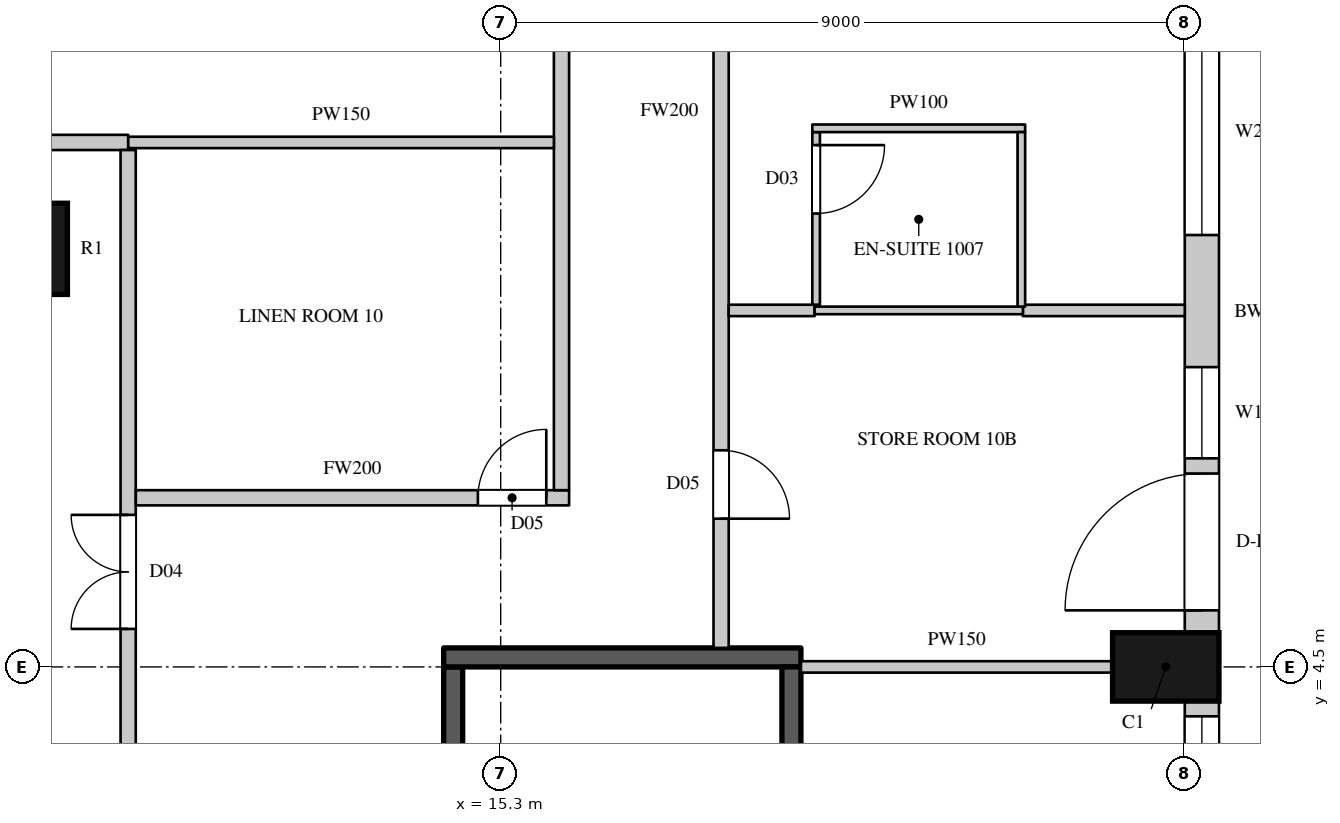
"""IFC4 building model, lengths in metres.
Left out: names, types, materials, properties, quantities, classifications, styles, units other than length and angle.
Written with IfcOpenShell. Run it as: python <this file> out.ifc"""

import sys

from ifc_helpers import new_model, si_unit, direction, frame, frame_2d, origin, origin_2d, place, context, subcontext, project, spatial, rectangle, circle, extrude, element, fill, save


model = new_model("IFC4")
c1 = context("Model", 3, precision=1e-05, world=origin(), true_north=direction((0.0, 1.0)))
c2 = subcontext(c1, "Body", "Model", "MODEL_VIEW")
j1 = project(units=[si_unit("LENGTHUNIT", "METRE"), si_unit("PLANEANGLEUNIT", "RADIAN")], contexts=[c1])
p1 = place(None, origin())
s1 = spatial("IfcSite", under=j1, at=p1, CompositionType="ELEMENT")
p2 = place(p1, origin())
s2 = spatial("IfcBuilding", under=s1, at=p2, CompositionType="ELEMENT")
p3 = place(p2, frame((0.0, 0.0, 66.3)))
s3 = spatial("IfcBuildingStorey", under=s2, at=p3, CompositionType="ELEMENT", Elevation=66.3)
p4 = place(p3, frame((24.05, 4.5, 0.0), z_axis=(0.0, 0.0, 1.0), x_axis=(0.0, 1.0, 0.0)))
e1 = element("IfcColumn", 1, at=p4, inside=s3, PredefinedType="COLUMN", context=c2, shape_type="SweptSolid", body=[
    extrude(rectangle(XDim=0.9, YDim=1.4, at=origin_2d()), origin(), (0.0, 0.0, 1.0), 3.6),
])
p5 = place(p3, frame((9.0, 10.0, 0.0), z_axis=(0.0, 0.0, 1.0), x_axis=(1.0, 0.0, 0.0)))
e2 = element("IfcColumn", 2, at=p5, inside=s3, PredefinedType="COLUMN", context=c2, shape_type="SweptSolid", body=[
    extrude(circle(Radius=0.6, at=origin_2d()), origin(), (0.0, 0.0, 1.0), 3.6),
])
p6 = place(p3, frame((24.525, -4.05, 0.0), z_axis=(0.0, 0.0, 1.0), x_axis=(0.0, 1.0, 0.0)))
e3 = element("IfcWall", 3, at=p6, inside=s3, PredefinedType="SOLIDWALL", context=c2, shape_type="SweptSolid", body=[
    extrude(rectangle(XDim=8.1, YDim=0.45, at=frame_2d((4.05, 0.0))), origin(), (0.0, 0.0, 1.0), 3.3),
])
p7 = place(p6, frame((0.2, 0.0, 0.0)))
e4 = element("IfcOpeningElement", 4, at=p7, cuts=e3, PredefinedType="OPENING", context=c2, shape_type="SweptSolid", body=[
    extrude(rectangle(XDim=1.8, YDim=2.4, at=frame_2d((0.9, 1.2))), frame((0.0, 0.235, 0.0), z_axis=(0.0, -1.0, 0.0), x_axis=(1.0, 0.0, 0.0)), (0.0, 0.0, 1.0), 0.47),
])
p8 = place(p6, frame((2.2, 0.0, 1.05)))
e5 = element("IfcOpeningElement", 5, at=p8, cuts=e3, PredefinedType="OPENING", context=c2, shape_type="SweptSolid", body=[
    extrude(rectangle(XDim=1.2, YDim=2.0, at=frame_2d((0.6, 1.0))), frame((0.0, 0.235, 0.0), z_axis=(0.0, -1.0, 0.0), x_axis=(1.0, 0.0, 0.0)), (0.0, 0.0, 1.0), 0.47),
])
p9 = place(p6, frame((4.7, 0.0, 0.0)))
e6 = element("IfcOpeningElement", 6, at=p9, cuts=e3, PredefinedType="OPENING", context=c2, shape_type="SweptSolid", body=[
    extrude(rectangle(XDim=1.8, YDim=2.4, at=frame_2d((0.9, 1.2))), frame((0.0, 0.235, 0.0), z_axis=(0.0, -1.0, 0.0), x_axis=(1.0, 0.0, 0.0)), (0.0, 0.0, 1.0), 0.47),
])
p10 = place(p6, frame((6.7, 0.0, 1.05)))
e7 = element("IfcOpeningElement", 7, at=p10, cuts=e3, PredefinedType="OPENING", context=c2, shape_type="SweptSolid", body=[
    extrude(rectangle(XDim=1.2, YDim=2.0, at=frame_2d((0.6, 1.0))), frame((0.0, 0.235, 0.0), z_axis=(0.0, -1.0, 0.0), x_axis=(1.0, 0.0, 0.0)), (0.0, 0.0, 1.0), 0.47),
])
p11 = place(p3, frame((24.525, 4.95, 0.0), z_axis=(0.0, 0.0, 1.0), x_axis=(0.0, 1.0, 0.0)))
e8 = element("IfcWall", 8, at=p11, inside=s3, PredefinedType="SOLIDWALL", context=c2, shape_type="SweptSolid", body=[
    extrude(rectangle(XDim=8.439, YDim=0.45, at=frame_2d((4.219, 0.0))), origin(), (0.0, 0.0, 1.0), 3.3),
])
p12 = place(p11, frame((0.294, 0.0, 0.0)))
e9 = element("IfcOpeningElement", 9, at=p12, cuts=e8, PredefinedType="OPENING", context=c2, shape_type="SweptSolid", body=[
    extrude(rectangle(XDim=1.8, YDim=2.4, at=frame_2d((0.9, 1.2))), frame((0.0, 0.235, 0.0), z_axis=(0.0, -1.0, 0.0), x_axis=(1.0, 0.0, 0.0)), (0.0, 0.0, 1.0), 0.47),
])
p13 = place(p11, frame((2.294, 0.0, 1.05)))
e10 = element("IfcOpeningElement", 10, at=p13, cuts=e8, PredefinedType="OPENING", context=c2, shape_type="SweptSolid", body=[
    extrude(rectangle(XDim=1.2, YDim=2.0, at=frame_2d((0.6, 1.0))), frame((0.0, 0.235, 0.0), z_axis=(0.0, -1.0, 0.0), x_axis=(1.0, 0.0, 0.0)), (0.0, 0.0, 1.0), 0.47),
])
p14 = place(p11, frame((5.232, 0.0, 1.05)))
e11 = element("IfcOpeningElement", 11, at=p14, cuts=e8, PredefinedType="OPENING", context=c2, shape_type="SweptSolid", body=[
    extrude(rectangle(XDim=2.7, YDim=2.0, at=frame_2d((1.35, 1.0))), frame((0.0, 0.235, 0.0), z_axis=(0.0, -1.0, 0.0), x_axis=(1.0, 0.0, 0.0)), (0.0, 0.0, 1.0), 0.47),
])
p15 = place(p3, frame((-8.3, 11.4, 0.0), z_axis=(0.0, 0.0, 1.0), x_axis=(1.0, 0.0, 0.0)))
e12 = element("IfcWall", 12, at=p15, inside=s3, PredefinedType="PARTITIONING", context=c2, shape_type="SweptSolid", body=[
    extrude(rectangle(XDim=18.7, YDim=0.2, at=frame_2d((9.35, 0.0))), origin(), (0.0, 0.0, 1.0), 3.3),
])
p16 = place(p15, frame((5.5, 0.0, 0.0)))
e13 = element("IfcOpeningElement", 13, at=p16, cuts=e12, PredefinedType="OPENING", context=c2, shape_type="SweptSolid", body=[
    extrude(rectangle(XDim=1.5, YDim=2.2, at=frame_2d((0.75, 1.1))), frame((0.0, 0.11, 0.0), z_axis=(0.0, -1.0, 0.0), x_axis=(1.0, 0.0, 0.0)), (0.0, 0.0, 1.0), 0.22),
])
p17 = place(p3, frame((10.399, -12.5, 0.0), z_axis=(0.0, 0.0, 1.0), x_axis=(0.0, 1.0, 0.0)))
e14 = element("IfcWall", 14, at=p17, inside=s3, PredefinedType="PARTITIONING", context=c2, shape_type="SweptSolid", body=[
    extrude(rectangle(XDim=23.8, YDim=0.2, at=frame_2d((11.9, 0.0))), origin(), (0.0, 0.0, 1.0), 3.3),
])
p18 = place(p17, frame((6.0, 0.0, 0.0)))
e15 = element("IfcOpeningElement", 15, at=p18, cuts=e14, PredefinedType="OPENING", context=c2, shape_type="SweptSolid", body=[
    extrude(rectangle(XDim=1.5, YDim=2.2, at=frame_2d((0.75, 1.1))), frame((0.0, 0.11, 0.0), z_axis=(0.0, -1.0, 0.0), x_axis=(1.0, 0.0, 0.0)), (0.0, 0.0, 1.0), 0.22),
])
p19 = place(p17, frame((17.5, 0.0, 0.0)))
e16 = element("IfcOpeningElement", 16, at=p19, cuts=e14, PredefinedType="OPENING", context=c2, shape_type="SweptSolid", body=[
    extrude(rectangle(XDim=1.5, YDim=2.2, at=frame_2d((0.75, 1.1))), frame((0.0, 0.11, 0.0), z_axis=(0.0, -1.0, 0.0), x_axis=(1.0, 0.0, 0.0)), (0.0, 0.0, 1.0), 0.22),
])
p20 = place(p17, frame((7.7, 0.0, 0.0)))
e17 = element("IfcOpeningElement", 17, at=p20, cuts=e14, PredefinedType="OPENING", context=c2, shape_type="SweptSolid", body=[
    extrude(rectangle(XDim=1.5, YDim=2.2, at=frame_2d((0.75, 1.1))), frame((0.0, 0.11, 0.0), z_axis=(0.0, -1.0, 0.0), x_axis=(1.0, 0.0, 0.0)), (0.0, 0.0, 1.0), 0.22),
])
p21 = place(p17, frame((13.15, 0.0, 0.0)))
e18 = element("IfcOpeningElement", 18, at=p21, cuts=e14, PredefinedType="OPENING", context=c2, shape_type="SweptSolid", body=[
    extrude(rectangle(XDim=1.5, YDim=2.2, at=frame_2d((0.75, 1.1))), frame((0.0, 0.11, 0.0), z_axis=(0.0, -1.0, 0.0), x_axis=(1.0, 0.0, 0.0)), (0.0, 0.0, 1.0), 0.22),
])
p22 = place(p3, frame((10.5, 6.725, 0.0), z_axis=(0.0, 0.0, 1.0), x_axis=(1.0, 0.0, 0.0)))
e19 = element("IfcWall", 19, at=p22, inside=s3, PredefinedType="PARTITIONING", context=c2, shape_type="SweptSolid", body=[
    extrude(rectangle(XDim=5.7, YDim=0.2, at=frame_2d((2.85, 0.0))), origin(), (0.0, 0.0, 1.0), 3.3),
])
p23 = place(p22, frame((4.5, 0.0, 0.0)))
e20 = element("IfcOpeningElement", 20, at=p23, cuts=e19, PredefinedType="OPENING", context=c2, shape_type="SweptSolid", body=[
    extrude(rectangle(XDim=0.9, YDim=2.2, at=frame_2d((0.45, 1.1))), frame((0.0, 0.11, 0.0), z_axis=(0.0, -1.0, 0.0), x_axis=(1.0, 0.0, 0.0)), (0.0, 0.0, 1.0), 0.22),
])
p24 = place(p3, frame((16.1, 6.825, 0.0), z_axis=(0.0, 0.0, 1.0), x_axis=(0.0, 1.0, 0.0)))
e21 = element("IfcWall", 21, at=p24, inside=s3, PredefinedType="PARTITIONING", context=c2, shape_type="SweptSolid", body=[
    extrude(rectangle(XDim=10.575, YDim=0.2, at=frame_2d((5.288, 0.0))), origin(), (0.0, 0.0, 1.0), 3.3),
])
p25 = place(p3, frame((18.2, 4.75, 0.0), z_axis=(0.0, 0.0, 1.0), x_axis=(0.0, 1.0, 0.0)))
e22 = element("IfcWall", 22, at=p25, inside=s3, PredefinedType="PARTITIONING", context=c2, shape_type="SweptSolid", body=[
    extrude(rectangle(XDim=14.134, YDim=0.2, at=frame_2d((7.067, 0.0))), origin(), (0.0, 0.0, 1.0), 3.3),
])
p26 = place(p25, frame((1.7, 0.0, 0.0)))
e23 = element("IfcOpeningElement", 23, at=p26, cuts=e22, PredefinedType="OPENING", context=c2, shape_type="SweptSolid", body=[
    extrude(rectangle(XDim=0.9, YDim=2.2, at=frame_2d((0.45, 1.1))), frame((0.0, 0.11, 0.0), z_axis=(0.0, -1.0, 0.0), x_axis=(1.0, 0.0, 0.0)), (0.0, 0.0, 1.0), 0.22),
])
p27 = place(p3, frame((10.4, 11.4, 0.0), z_axis=(0.0, 0.0, 1.0), x_axis=(1.0, 0.0, 0.0)))
e24 = element("IfcWall", 24, at=p27, inside=s3, PredefinedType="PARTITIONING", context=c2, shape_type="SweptSolid", body=[
    extrude(rectangle(XDim=5.6, YDim=0.15, at=frame_2d((2.8, 0.0))), origin(), (0.0, 0.0, 1.0), 3.3),
])
p28 = place(p3, frame((18.3, 9.19, 0.0), z_axis=(0.0, 0.0, 1.0), x_axis=(1.0, 0.0, 0.0)))
e25 = element("IfcWall", 25, at=p28, inside=s3, PredefinedType="PARTITIONING", context=c2, shape_type="SweptSolid", body=[
    extrude(rectangle(XDim=1.13, YDim=0.15, at=frame_2d((0.565, 0.0))), origin(), (0.0, 0.0, 1.0), 2.65),
])
p29 = place(p3, frame((19.25, 4.5, 0.0), z_axis=(0.0, 0.0, 1.0), x_axis=(1.0, 0.0, 0.0)))
e26 = element("IfcWall", 26, at=p29, inside=s3, PredefinedType="PARTITIONING", context=c2, shape_type="SweptSolid", body=[
    extrude(rectangle(XDim=4.1, YDim=0.15, at=frame_2d((2.05, 0.0))), origin(), (0.0, 0.0, 1.0), 3.3),
])
p30 = place(p3, frame((22.17, 9.19, 0.0), z_axis=(0.0, 0.0, 1.0), x_axis=(1.0, 0.0, 0.0)))
e27 = element("IfcWall", 27, at=p30, inside=s3, PredefinedType="PARTITIONING", context=c2, shape_type="SweptSolid", body=[
    extrude(rectangle(XDim=2.13, YDim=0.15, at=frame_2d((1.065, 0.0))), origin(), (0.0, 0.0, 1.0), 2.65),
])
p31 = place(p3, frame((14.675, -4.5, 0.0), z_axis=(0.0, 0.0, 1.0), x_axis=(0.0, 1.0, 0.0)))
e28 = element("IfcWall", 28, at=p31, inside=s3, PredefinedType="SHEAR", context=c2, shape_type="SweptSolid", body=[
    extrude(rectangle(XDim=9.0, YDim=0.25, at=frame_2d((4.5, 0.0))), origin(), (0.0, 0.0, 1.0), 3.3),
])
p32 = place(p31, frame((0.45, 0.0, 0.0)))
e29 = element("IfcOpeningElement", 29, at=p32, cuts=e28, PredefinedType="OPENING", context=c2, shape_type="SweptSolid", body=[
    extrude(rectangle(XDim=1.1, YDim=2.2, at=frame_2d((0.55, 1.1))), frame((0.0, 0.135, 0.0), z_axis=(0.0, -1.0, 0.0), x_axis=(1.0, 0.0, 0.0)), (0.0, 0.0, 1.0), 0.27),
])
p33 = place(p3, frame((14.55, 4.625, 0.0), z_axis=(0.0, 0.0, 1.0), x_axis=(1.0, 0.0, 0.0)))
e30 = element("IfcWall", 30, at=p33, inside=s3, PredefinedType="SHEAR", context=c2, shape_type="SweptSolid", body=[
    extrude(rectangle(XDim=4.7, YDim=0.25, at=frame_2d((2.35, 0.0))), origin(), (0.0, 0.0, 1.0), 3.3),
])
p34 = place(p3, frame((19.125, -4.5, 0.0), z_axis=(0.0, 0.0, 1.0), x_axis=(0.0, 1.0, 0.0)))
e31 = element("IfcWall", 31, at=p34, inside=s3, PredefinedType="SHEAR", context=c2, shape_type="SweptSolid", body=[
    extrude(rectangle(XDim=9.0, YDim=0.25, at=frame_2d((4.5, 0.0))), origin(), (0.0, 0.0, 1.0), 3.3),
])
p35 = place(p3, frame((19.43, 9.19, 0.0), z_axis=(0.0, 0.0, 1.0), x_axis=(1.0, 0.0, 0.0)))
e32 = element("IfcWall", 32, at=p35, inside=s3, PredefinedType="PARTITIONING", context=c2, shape_type="SweptSolid", body=[
    extrude(rectangle(XDim=2.74, YDim=0.1, at=frame_2d((1.37, 0.0))), origin(), (0.0, 0.0, 1.0), 2.65),
])
p36 = place(p3, frame((19.45, 9.265, 0.0), z_axis=(0.0, 0.0, 1.0), x_axis=(0.0, 1.0, 0.0)))
e33 = element("IfcWall", 33, at=p36, inside=s3, PredefinedType="PARTITIONING", context=c2, shape_type="SweptSolid", body=[
    extrude(rectangle(XDim=2.271, YDim=0.1, at=frame_2d((1.135, 0.0))), origin(), (0.0, 0.0, 1.0), 3.3),
])
p37 = place(p36, frame((1.2, 0.0, 0.0)))
e34 = element("IfcOpeningElement", 34, at=p37, cuts=e33, PredefinedType="OPENING", context=c2, shape_type="SweptSolid", body=[
    extrude(rectangle(XDim=0.9, YDim=2.2, at=frame_2d((0.45, 1.1))), frame((0.0, 0.06, 0.0), z_axis=(0.0, -1.0, 0.0), x_axis=(1.0, 0.0, 0.0)), (0.0, 0.0, 1.0), 0.12),
])
p38 = place(p3, frame((19.4, 11.586, 0.0), z_axis=(0.0, 0.0, 1.0), x_axis=(1.0, 0.0, 0.0)))
e35 = element("IfcWall", 35, at=p38, inside=s3, PredefinedType="PARTITIONING", context=c2, shape_type="SweptSolid", body=[
    extrude(rectangle(XDim=2.8, YDim=0.1, at=frame_2d((1.4, 0.0))), origin(), (0.0, 0.0, 1.0), 3.3),
])
p39 = place(p3, frame((22.15, 9.24, 0.0), z_axis=(0.0, 0.0, 1.0), x_axis=(0.0, 1.0, 0.0)))
e36 = element("IfcWall", 36, at=p39, inside=s3, PredefinedType="PARTITIONING", context=c2, shape_type="SweptSolid", body=[
    extrude(rectangle(XDim=2.296, YDim=0.1, at=frame_2d((1.148, 0.0))), origin(), (0.0, 0.0, 1.0), 3.3),
])
p40 = place(p10, origin())
e37 = element("IfcWindow", 37, at=p40, inside=s3, PartitioningType="SINGLE_PANEL", PredefinedType="WINDOW", context=c2, shape_type="SweptSolid", body=[
    extrude(rectangle(XDim=1.2, YDim=2.0, at=frame_2d((0.6, 1.0))), frame((0.0, 0.135, 0.0), z_axis=(0.0, -1.0, 0.0), x_axis=(1.0, 0.0, 0.0)), (0.0, 0.0, 1.0), 0.06),
])
fill(e7, e37)
p41 = place(p12, origin())
e38 = element("IfcDoor", 38, at=p41, inside=s3, OperationType="SLIDING_TO_LEFT", PredefinedType="DOOR", context=c2, shape_type="SweptSolid", body=[
    extrude(rectangle(XDim=1.8, YDim=2.4, at=frame_2d((0.9, 1.2))), frame((0.0, 0.13, 0.0), z_axis=(0.0, -1.0, 0.0), x_axis=(1.0, 0.0, 0.0)), (0.0, 0.0, 1.0), 0.05),
])
fill(e9, e38)
p42 = place(p13, origin())
e39 = element("IfcWindow", 39, at=p42, inside=s3, PartitioningType="SINGLE_PANEL", PredefinedType="WINDOW", context=c2, shape_type="SweptSolid", body=[
    extrude(rectangle(XDim=1.2, YDim=2.0, at=frame_2d((0.6, 1.0))), frame((0.0, 0.135, 0.0), z_axis=(0.0, -1.0, 0.0), x_axis=(1.0, 0.0, 0.0)), (0.0, 0.0, 1.0), 0.06),
])
fill(e10, e39)
p43 = place(p14, origin())
e40 = element("IfcWindow", 40, at=p43, inside=s3, PartitioningType="SINGLE_PANEL", PredefinedType="WINDOW", context=c2, shape_type="SweptSolid", body=[
    extrude(rectangle(XDim=2.7, YDim=2.0, at=frame_2d((1.35, 1.0))), frame((0.0, 0.135, 0.0), z_axis=(0.0, -1.0, 0.0), x_axis=(1.0, 0.0, 0.0)), (0.0, 0.0, 1.0), 0.06),
])
fill(e11, e40)
p44 = place(p19, origin())
e41 = element("IfcDoor", 41, at=p44, inside=s3, OperationType="DOUBLE_DOOR_SINGLE_SWING", PredefinedType="DOOR", context=c2, shape_type="SweptSolid", body=[
    extrude(rectangle(XDim=1.5, YDim=2.2, at=frame_2d((0.75, 1.1))), frame((0.0, 0.025, 0.0), z_axis=(0.0, -1.0, 0.0), x_axis=(1.0, 0.0, 0.0)), (0.0, 0.0, 1.0), 0.05),
])
fill(e16, e41)
p45 = place(p23, origin())
e42 = element("IfcDoor", 42, at=p45, inside=s3, OperationType="SINGLE_SWING_RIGHT", PredefinedType="DOOR", context=c2, shape_type="SweptSolid", body=[
    extrude(rectangle(XDim=0.9, YDim=2.2, at=frame_2d((0.45, 1.1))), frame((0.0, 0.025, 0.0), z_axis=(0.0, -1.0, 0.0), x_axis=(1.0, 0.0, 0.0)), (0.0, 0.0, 1.0), 0.05),
])
fill(e20, e42)
p46 = place(p26, origin())
e43 = element("IfcDoor", 43, at=p46, inside=s3, OperationType="SINGLE_SWING_RIGHT", PredefinedType="DOOR", context=c2, shape_type="SweptSolid", body=[
    extrude(rectangle(XDim=0.9, YDim=2.2, at=frame_2d((0.45, 1.1))), frame((0.0, 0.025, 0.0), z_axis=(0.0, -1.0, 0.0), x_axis=(1.0, 0.0, 0.0)), (0.0, 0.0, 1.0), 0.05),
])
fill(e23, e43)
p47 = place(p37, origin())
e44 = element("IfcDoor", 44, at=p47, inside=s3, OperationType="SINGLE_SWING_LEFT", PredefinedType="DOOR", context=c2, shape_type="SweptSolid", body=[
    extrude(rectangle(XDim=0.9, YDim=2.2, at=frame_2d((0.45, 1.1))), frame((0.0, 0.025, 0.0), z_axis=(0.0, -1.0, 0.0), x_axis=(1.0, 0.0, 0.0)), (0.0, 0.0, 1.0), 0.05),
])
fill(e34, e44)
save(model, sys.argv[1])
